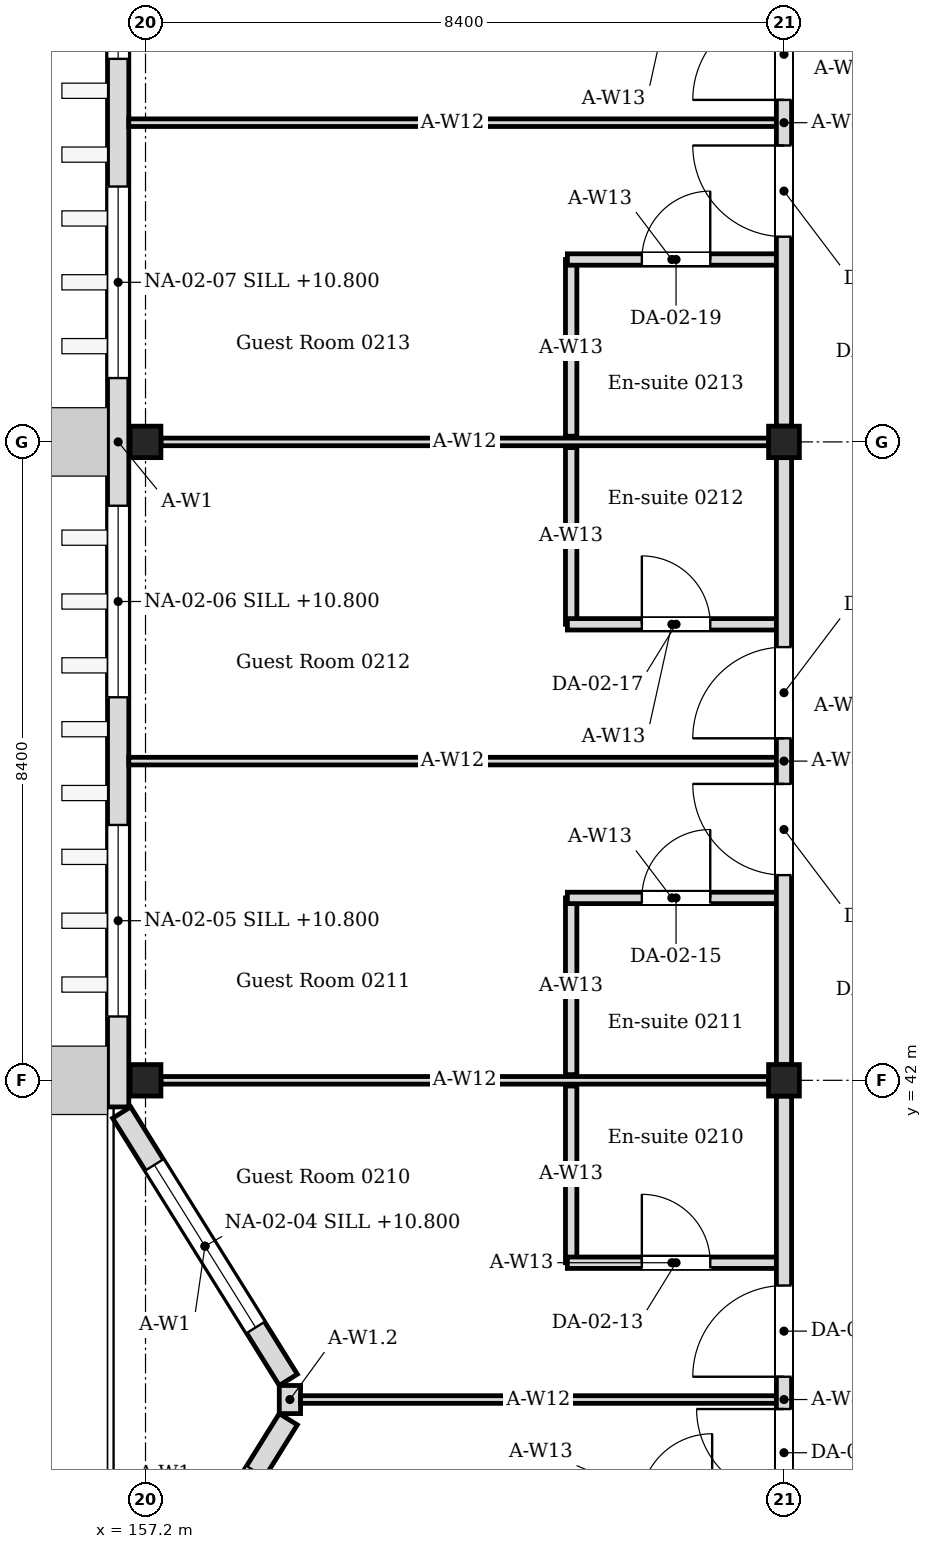
"""IFC4 building model, lengths in metres.
Left out: names, types, materials, properties, quantities, classifications, styles, units other than length and angle.
Written with IfcOpenShell. Run it as: python <this file> out.ifc"""

import sys

from ifc_helpers import new_model, si_unit, direction, frame, frame_2d, origin, origin_2d, place, context, subcontext, project, spatial, rectangle, i_section, extrude, element, fill, save


model = new_model("IFC4")
c1 = context("Model", 3, precision=1e-05, world=origin(), true_north=direction((0.0, 1.0)))
c2 = subcontext(c1, "Body", "Model", "MODEL_VIEW")
j1 = project(units=[si_unit("LENGTHUNIT", "METRE"), si_unit("PLANEANGLEUNIT", "RADIAN")], contexts=[c1])
p1 = place(None, origin())
s1 = spatial("IfcSite", under=j1, at=p1, CompositionType="ELEMENT")
p2 = place(p1, origin())
s2 = spatial("IfcBuilding", under=s1, at=p2, CompositionType="ELEMENT")
p3 = place(p2, frame((0.0, 0.0, 10.2)))
s3 = spatial("IfcBuildingStorey", under=s2, at=p3, CompositionType="ELEMENT", Elevation=10.2)
for number, where, z_axis, x_axis in (
    (1, (157.2, 42.0, 0.0), (0.0, 0.0, 1.0), (1.0, 0.0, 0.0)),
    (2, (157.2, 50.4, 0.0), (0.0, 0.0, 1.0), (1.0, 0.0, 0.0)),
    (3, (165.6, 42.0, 0.0), (0.0, 0.0, 1.0), (1.0, 0.0, 0.0)),
    (4, (165.6, 50.4, 0.0), (0.0, 0.0, 1.0), (1.0, 0.0, 0.0)),
):
    element("IfcColumn", number, at=place(p3, frame(where, z_axis=z_axis, x_axis=x_axis)), inside=s3, PredefinedType="COLUMN", context=c2, shape_type="SweptSolid", body=[
        extrude(i_section(OverallWidth=0.405, OverallDepth=0.414, WebThickness=0.018, FlangeThickness=0.028, FilletRadius=0.022, at=origin_2d()), origin(), (0.0, 0.0, 1.0), 4.2),
    ])
p4 = place(p3, frame((156.886, 34.024, 0.0), z_axis=(0.0, 0.0, 1.0), x_axis=(0.529018946142, 0.848610013271, 0.0)))
e5 = element("IfcWall", 5, at=p4, inside=s3, PredefinedType="SOLIDWALL", context=c2, shape_type="SweptSolid", body=[
    extrude(rectangle(XDim=4.144, YDim=0.28, at=frame_2d((2.072, 0.0))), origin(), (0.0, 0.0, 1.0), 4.05),
])
p5 = place(p4, frame((0.812, 0.0, 0.45)))
e6 = element("IfcOpeningElement", 6, at=p5, cuts=e5, PredefinedType="OPENING", context=c2, shape_type="SweptSolid", body=[
    extrude(rectangle(XDim=2.52, YDim=2.1, at=frame_2d((1.26, 1.05))), frame((0.0, 0.15, 0.0), z_axis=(0.0, -1.0, 0.0), x_axis=(1.0, 0.0, 0.0)), (0.0, 0.0, 1.0), 0.3),
])
p6 = place(p3, frame((159.079, 38.059, 0.0), z_axis=(0.0, 0.0, 1.0), x_axis=(-0.529018946142, 0.848610013271, 0.0)))
e7 = element("IfcWall", 7, at=p6, inside=s3, PredefinedType="SOLIDWALL", context=c2, shape_type="SweptSolid", body=[
    extrude(rectangle(XDim=4.144, YDim=0.28, at=frame_2d((2.072, 0.0))), origin(), (0.0, 0.0, 1.0), 4.05),
])
p7 = place(p6, frame((0.812, 0.0, 0.6)))
e8 = element("IfcOpeningElement", 8, at=p7, cuts=e7, PredefinedType="OPENING", context=c2, shape_type="SweptSolid", body=[
    extrude(rectangle(XDim=2.52, YDim=2.4, at=frame_2d((1.26, 1.2))), frame((0.0, 0.15, 0.0), z_axis=(0.0, -1.0, 0.0), x_axis=(1.0, 0.0, 0.0)), (0.0, 0.0, 1.0), 0.3),
])
p8 = place(p3, frame((159.1, 37.615, 0.0), z_axis=(0.0, 0.0, 1.0), x_axis=(0.0, 1.0, 0.0)))
e9 = element("IfcWall", 9, at=p8, inside=s3, PredefinedType="SOLIDWALL", context=c2, shape_type="SweptSolid", body=[
    extrude(rectangle(XDim=0.37, YDim=0.28, at=frame_2d((0.185, 0.0))), origin(), (0.0, 0.0, 1.0), 3.604),
])
p9 = place(p3, frame((156.84, 41.65, 0.0), z_axis=(0.0, 0.0, 1.0), x_axis=(0.0, 1.0, 0.0)))
e10 = element("IfcWall", 10, at=p9, inside=s3, PredefinedType="SOLIDWALL", context=c2, shape_type="SweptSolid", body=[
    extrude(rectangle(XDim=17.5, YDim=0.28, at=frame_2d((8.75, 0.0))), origin(), (0.0, 0.0, 1.0), 4.05),
])
p10 = place(p9, frame((1.19, 0.0, 0.6)))
e11 = element("IfcOpeningElement", 11, at=p10, cuts=e10, PredefinedType="OPENING", context=c2, shape_type="SweptSolid", body=[
    extrude(rectangle(XDim=2.52, YDim=2.4, at=frame_2d((1.26, 1.2))), frame((0.0, 0.15, 0.0), z_axis=(0.0, -1.0, 0.0), x_axis=(1.0, 0.0, 0.0)), (0.0, 0.0, 1.0), 0.3),
])
p11 = place(p9, frame((5.39, 0.0, 0.6)))
e12 = element("IfcOpeningElement", 12, at=p11, cuts=e10, PredefinedType="OPENING", context=c2, shape_type="SweptSolid", body=[
    extrude(rectangle(XDim=2.52, YDim=2.4, at=frame_2d((1.26, 1.2))), frame((0.0, 0.15, 0.0), z_axis=(0.0, -1.0, 0.0), x_axis=(1.0, 0.0, 0.0)), (0.0, 0.0, 1.0), 0.3),
])
p12 = place(p9, frame((9.59, 0.0, 0.6)))
e13 = element("IfcOpeningElement", 13, at=p12, cuts=e10, PredefinedType="OPENING", context=c2, shape_type="SweptSolid", body=[
    extrude(rectangle(XDim=2.52, YDim=2.4, at=frame_2d((1.26, 1.2))), frame((0.0, 0.15, 0.0), z_axis=(0.0, -1.0, 0.0), x_axis=(1.0, 0.0, 0.0)), (0.0, 0.0, 1.0), 0.3),
])
p13 = place(p9, frame((13.79, 0.0, 0.6)))
e14 = element("IfcOpeningElement", 14, at=p13, cuts=e10, PredefinedType="OPENING", context=c2, shape_type="SweptSolid", body=[
    extrude(rectangle(XDim=2.52, YDim=2.4, at=frame_2d((1.26, 1.2))), frame((0.0, 0.15, 0.0), z_axis=(0.0, -1.0, 0.0), x_axis=(1.0, 0.0, 0.0)), (0.0, 0.0, 1.0), 0.3),
])
p14 = place(p3, frame((162.8, 39.6, 0.0), z_axis=(0.0, 0.0, 1.0), x_axis=(0.0, 1.0, 0.0)))
e15 = element("IfcWall", 15, at=p14, inside=s3, PredefinedType="PARTITIONING", context=c2, shape_type="SweptSolid", body=[
    extrude(rectangle(XDim=2.325, YDim=0.15, at=frame_2d((1.163, 0.0))), origin(), (0.0, 0.0, 1.0), 4.05),
])
p15 = place(p3, frame((162.75, 39.6, 0.0), z_axis=(0.0, 0.0, 1.0), x_axis=(1.0, 0.0, 0.0)))
e16 = element("IfcWall", 16, at=p15, inside=s3, PredefinedType="PARTITIONING", context=c2, shape_type="SweptSolid", body=[
    extrude(rectangle(XDim=2.75, YDim=0.15, at=frame_2d((1.375, 0.0))), origin(), (0.0, 0.0, 1.0), 4.05),
])
p16 = place(p15, frame((0.98, 0.0, 0.0)))
e17 = element("IfcOpeningElement", 17, at=p16, cuts=e16, PredefinedType="OPENING", context=c2, shape_type="SweptSolid", body=[
    extrude(rectangle(XDim=0.9, YDim=2.1, at=frame_2d((0.45, 1.05))), frame((0.0, 0.085, 0.0), z_axis=(0.0, -1.0, 0.0), x_axis=(1.0, 0.0, 0.0)), (0.0, 0.0, 1.0), 0.17),
])
p17 = place(p3, frame((162.8, 42.075, 0.0), z_axis=(0.0, 0.0, 1.0), x_axis=(0.0, 1.0, 0.0)))
e18 = element("IfcWall", 18, at=p17, inside=s3, PredefinedType="PARTITIONING", context=c2, shape_type="SweptSolid", body=[
    extrude(rectangle(XDim=2.325, YDim=0.15, at=frame_2d((1.163, 0.0))), origin(), (0.0, 0.0, 1.0), 4.05),
])
p18 = place(p3, frame((162.75, 44.4, 0.0), z_axis=(0.0, 0.0, 1.0), x_axis=(1.0, 0.0, 0.0)))
e19 = element("IfcWall", 19, at=p18, inside=s3, PredefinedType="PARTITIONING", context=c2, shape_type="SweptSolid", body=[
    extrude(rectangle(XDim=2.75, YDim=0.15, at=frame_2d((1.375, 0.0))), origin(), (0.0, 0.0, 1.0), 4.05),
])
p19 = place(p18, frame((0.98, 0.0, 0.0)))
e20 = element("IfcOpeningElement", 20, at=p19, cuts=e19, PredefinedType="OPENING", context=c2, shape_type="SweptSolid", body=[
    extrude(rectangle(XDim=0.9, YDim=2.1, at=frame_2d((0.45, 1.05))), frame((0.0, 0.085, 0.0), z_axis=(0.0, -1.0, 0.0), x_axis=(1.0, 0.0, 0.0)), (0.0, 0.0, 1.0), 0.17),
])
p20 = place(p3, frame((162.8, 48.0, 0.0), z_axis=(0.0, 0.0, 1.0), x_axis=(0.0, 1.0, 0.0)))
e21 = element("IfcWall", 21, at=p20, inside=s3, PredefinedType="PARTITIONING", context=c2, shape_type="SweptSolid", body=[
    extrude(rectangle(XDim=2.325, YDim=0.15, at=frame_2d((1.163, 0.0))), origin(), (0.0, 0.0, 1.0), 4.05),
])
p21 = place(p3, frame((162.75, 48.0, 0.0), z_axis=(0.0, 0.0, 1.0), x_axis=(1.0, 0.0, 0.0)))
e22 = element("IfcWall", 22, at=p21, inside=s3, PredefinedType="PARTITIONING", context=c2, shape_type="SweptSolid", body=[
    extrude(rectangle(XDim=2.75, YDim=0.15, at=frame_2d((1.375, 0.0))), origin(), (0.0, 0.0, 1.0), 4.05),
])
p22 = place(p21, frame((0.98, 0.0, 0.0)))
e23 = element("IfcOpeningElement", 23, at=p22, cuts=e22, PredefinedType="OPENING", context=c2, shape_type="SweptSolid", body=[
    extrude(rectangle(XDim=0.9, YDim=2.1, at=frame_2d((0.45, 1.05))), frame((0.0, 0.085, 0.0), z_axis=(0.0, -1.0, 0.0), x_axis=(1.0, 0.0, 0.0)), (0.0, 0.0, 1.0), 0.17),
])
p23 = place(p3, frame((162.8, 50.475, 0.0), z_axis=(0.0, 0.0, 1.0), x_axis=(0.0, 1.0, 0.0)))
e24 = element("IfcWall", 24, at=p23, inside=s3, PredefinedType="PARTITIONING", context=c2, shape_type="SweptSolid", body=[
    extrude(rectangle(XDim=2.325, YDim=0.15, at=frame_2d((1.163, 0.0))), origin(), (0.0, 0.0, 1.0), 4.05),
])
p24 = place(p3, frame((162.75, 52.8, 0.0), z_axis=(0.0, 0.0, 1.0), x_axis=(1.0, 0.0, 0.0)))
e25 = element("IfcWall", 25, at=p24, inside=s3, PredefinedType="PARTITIONING", context=c2, shape_type="SweptSolid", body=[
    extrude(rectangle(XDim=2.75, YDim=0.15, at=frame_2d((1.375, 0.0))), origin(), (0.0, 0.0, 1.0), 4.05),
])
p25 = place(p24, frame((0.98, 0.0, 0.0)))
e26 = element("IfcOpeningElement", 26, at=p25, cuts=e25, PredefinedType="OPENING", context=c2, shape_type="SweptSolid", body=[
    extrude(rectangle(XDim=0.9, YDim=2.1, at=frame_2d((0.45, 1.05))), frame((0.0, 0.085, 0.0), z_axis=(0.0, -1.0, 0.0), x_axis=(1.0, 0.0, 0.0)), (0.0, 0.0, 1.0), 0.17),
])
for number, where, z_axis, x_axis in (
    (27, (157.403, 42.0, 0.0), (0.0, 0.0, 1.0), (1.0, 0.0, 0.0)),
    (28, (157.403, 50.4, 0.0), (0.0, 0.0, 1.0), (1.0, 0.0, 0.0)),
):
    element("IfcWall", number, at=place(p3, frame(where, z_axis=z_axis, x_axis=x_axis)), inside=s3, PredefinedType="PARTITIONING", context=c2, shape_type="SweptSolid", body=[
        extrude(rectangle(XDim=7.995, YDim=0.1, at=frame_2d((3.998, 0.0))), origin(), (0.0, 0.0, 1.0), 3.604),
    ])
p26 = place(p3, frame((159.24, 37.8, 0.0), z_axis=(0.0, 0.0, 1.0), x_axis=(1.0, 0.0, 0.0)))
e29 = element("IfcWall", 29, at=p26, inside=s3, PredefinedType="PARTITIONING", context=c2, shape_type="SweptSolid", body=[
    extrude(rectangle(XDim=6.26, YDim=0.1, at=frame_2d((3.13, 0.0))), origin(), (0.0, 0.0, 1.0), 3.604),
])
for number, where, z_axis, x_axis in (
    (30, (156.98, 46.2, 0.0), (0.0, 0.0, 1.0), (1.0, 0.0, 0.0)),
    (31, (156.98, 54.6, 0.0), (0.0, 0.0, 1.0), (1.0, 0.0, 0.0)),
):
    element("IfcWall", number, at=place(p3, frame(where, z_axis=z_axis, x_axis=x_axis)), inside=s3, PredefinedType="PARTITIONING", context=c2, shape_type="SweptSolid", body=[
        extrude(rectangle(XDim=8.52, YDim=0.1, at=frame_2d((4.26, 0.0))), origin(), (0.0, 0.0, 1.0), 3.604),
    ])
p27 = place(p3, frame((165.6, 33.807, 0.0), z_axis=(0.0, 0.0, 1.0), x_axis=(0.0, 1.0, 0.0)))
e32 = element("IfcWall", 32, at=p27, inside=s3, PredefinedType="PARTITIONING", context=c2, shape_type="SweptSolid", body=[
    extrude(rectangle(XDim=7.986, YDim=0.2, at=frame_2d((3.993, 0.0))), origin(), (0.0, 0.0, 1.0), 3.45),
])
p28 = place(p27, frame((2.718, 0.0, 0.0)))
e33 = element("IfcOpeningElement", 33, at=p28, cuts=e32, PredefinedType="OPENING", context=c2, shape_type="SweptSolid", body=[
    extrude(rectangle(XDim=1.15, YDim=2.1, at=frame_2d((0.575, 1.05))), frame((0.0, 0.11, 0.0), z_axis=(0.0, -1.0, 0.0), x_axis=(1.0, 0.0, 0.0)), (0.0, 0.0, 1.0), 0.22),
])
p29 = place(p27, frame((4.293, 0.0, 0.0)))
e34 = element("IfcOpeningElement", 34, at=p29, cuts=e32, PredefinedType="OPENING", context=c2, shape_type="SweptSolid", body=[
    extrude(rectangle(XDim=1.2, YDim=2.1, at=frame_2d((0.6, 1.05))), frame((0.0, 0.11, 0.0), z_axis=(0.0, -1.0, 0.0), x_axis=(1.0, 0.0, 0.0)), (0.0, 0.0, 1.0), 0.22),
])
p30 = place(p3, frame((165.6, 42.207, 0.0), z_axis=(0.0, 0.0, 1.0), x_axis=(0.0, 1.0, 0.0)))
e35 = element("IfcWall", 35, at=p30, inside=s3, PredefinedType="PARTITIONING", context=c2, shape_type="SweptSolid", body=[
    extrude(rectangle(XDim=7.986, YDim=0.2, at=frame_2d((3.993, 0.0))), origin(), (0.0, 0.0, 1.0), 3.45),
])
p31 = place(p30, frame((2.493, 0.0, 0.0)))
e36 = element("IfcOpeningElement", 36, at=p31, cuts=e35, PredefinedType="OPENING", context=c2, shape_type="SweptSolid", body=[
    extrude(rectangle(XDim=1.2, YDim=2.1, at=frame_2d((0.6, 1.05))), frame((0.0, 0.11, 0.0), z_axis=(0.0, -1.0, 0.0), x_axis=(1.0, 0.0, 0.0)), (0.0, 0.0, 1.0), 0.22),
])
p32 = place(p30, frame((4.293, 0.0, 0.0)))
e37 = element("IfcOpeningElement", 37, at=p32, cuts=e35, PredefinedType="OPENING", context=c2, shape_type="SweptSolid", body=[
    extrude(rectangle(XDim=1.2, YDim=2.1, at=frame_2d((0.6, 1.05))), frame((0.0, 0.11, 0.0), z_axis=(0.0, -1.0, 0.0), x_axis=(1.0, 0.0, 0.0)), (0.0, 0.0, 1.0), 0.22),
])
p33 = place(p3, frame((165.6, 50.607, 0.0), z_axis=(0.0, 0.0, 1.0), x_axis=(0.0, 1.0, 0.0)))
e38 = element("IfcWall", 38, at=p33, inside=s3, PredefinedType="PARTITIONING", context=c2, shape_type="SweptSolid", body=[
    extrude(rectangle(XDim=7.986, YDim=0.2, at=frame_2d((3.993, 0.0))), origin(), (0.0, 0.0, 1.0), 3.45),
])
p34 = place(p33, frame((2.493, 0.0, 0.0)))
e39 = element("IfcOpeningElement", 39, at=p34, cuts=e38, PredefinedType="OPENING", context=c2, shape_type="SweptSolid", body=[
    extrude(rectangle(XDim=1.2, YDim=2.1, at=frame_2d((0.6, 1.05))), frame((0.0, 0.11, 0.0), z_axis=(0.0, -1.0, 0.0), x_axis=(1.0, 0.0, 0.0)), (0.0, 0.0, 1.0), 0.22),
])
p35 = place(p33, frame((4.293, 0.0, 0.0)))
e40 = element("IfcOpeningElement", 40, at=p35, cuts=e38, PredefinedType="OPENING", context=c2, shape_type="SweptSolid", body=[
    extrude(rectangle(XDim=1.2, YDim=2.1, at=frame_2d((0.6, 1.05))), frame((0.0, 0.11, 0.0), z_axis=(0.0, -1.0, 0.0), x_axis=(1.0, 0.0, 0.0)), (0.0, 0.0, 1.0), 0.22),
])
p36 = place(p7, origin())
e41 = element("IfcWindow", 41, at=p36, inside=s3, PartitioningType="SINGLE_PANEL", PredefinedType="WINDOW", context=c2, shape_type="SweptSolid", body=[
    extrude(rectangle(XDim=2.52, YDim=2.4, at=frame_2d((1.26, 1.2))), frame((0.0, 0.03, 0.0), z_axis=(0.0, -1.0, 0.0), x_axis=(1.0, 0.0, 0.0)), (0.0, 0.0, 1.0), 0.06),
])
fill(e8, e41)
p37 = place(p10, origin())
e42 = element("IfcWindow", 42, at=p37, inside=s3, PartitioningType="SINGLE_PANEL", PredefinedType="WINDOW", context=c2, shape_type="SweptSolid", body=[
    extrude(rectangle(XDim=2.52, YDim=2.4, at=frame_2d((1.26, 1.2))), frame((0.0, 0.03, 0.0), z_axis=(0.0, -1.0, 0.0), x_axis=(1.0, 0.0, 0.0)), (0.0, 0.0, 1.0), 0.06),
])
fill(e11, e42)
p38 = place(p11, origin())
e43 = element("IfcWindow", 43, at=p38, inside=s3, PartitioningType="SINGLE_PANEL", PredefinedType="WINDOW", context=c2, shape_type="SweptSolid", body=[
    extrude(rectangle(XDim=2.52, YDim=2.4, at=frame_2d((1.26, 1.2))), frame((0.0, 0.03, 0.0), z_axis=(0.0, -1.0, 0.0), x_axis=(1.0, 0.0, 0.0)), (0.0, 0.0, 1.0), 0.06),
])
fill(e12, e43)
p39 = place(p12, origin())
e44 = element("IfcWindow", 44, at=p39, inside=s3, PartitioningType="SINGLE_PANEL", PredefinedType="WINDOW", context=c2, shape_type="SweptSolid", body=[
    extrude(rectangle(XDim=2.52, YDim=2.4, at=frame_2d((1.26, 1.2))), frame((0.0, 0.03, 0.0), z_axis=(0.0, -1.0, 0.0), x_axis=(1.0, 0.0, 0.0)), (0.0, 0.0, 1.0), 0.06),
])
fill(e13, e44)
p40 = place(p13, origin())
e45 = element("IfcWindow", 45, at=p40, inside=s3, PartitioningType="SINGLE_PANEL", PredefinedType="WINDOW", context=c2, shape_type="SweptSolid", body=[
    extrude(rectangle(XDim=2.52, YDim=2.4, at=frame_2d((1.26, 1.2))), frame((0.0, 0.03, 0.0), z_axis=(0.0, -1.0, 0.0), x_axis=(1.0, 0.0, 0.0)), (0.0, 0.0, 1.0), 0.06),
])
fill(e14, e45)
p41 = place(p28, origin())
e46 = element("IfcDoor", 46, at=p41, inside=s3, OperationType="SINGLE_SWING_RIGHT", PredefinedType="DOOR", context=c2, shape_type="SweptSolid", body=[
    extrude(rectangle(XDim=1.15, YDim=2.1, at=frame_2d((0.575, 1.05))), frame((0.0, 0.025, 0.0), z_axis=(0.0, -1.0, 0.0), x_axis=(1.0, 0.0, 0.0)), (0.0, 0.0, 1.0), 0.05),
])
fill(e33, e46)
p42 = place(p16, origin())
e47 = element("IfcDoor", 47, at=p42, inside=s3, OperationType="SINGLE_SWING_LEFT", PredefinedType="DOOR", context=c2, shape_type="SweptSolid", body=[
    extrude(rectangle(XDim=0.9, YDim=2.1, at=frame_2d((0.45, 1.05))), frame((0.0, 0.025, 0.0), z_axis=(0.0, -1.0, 0.0), x_axis=(1.0, 0.0, 0.0)), (0.0, 0.0, 1.0), 0.05),
])
fill(e17, e47)
p43 = place(p29, origin())
e48 = element("IfcDoor", 48, at=p43, inside=s3, OperationType="SINGLE_SWING_LEFT", PredefinedType="DOOR", context=c2, shape_type="SweptSolid", body=[
    extrude(rectangle(XDim=1.2, YDim=2.1, at=frame_2d((0.6, 1.05))), frame((0.0, 0.025, 0.0), z_axis=(0.0, -1.0, 0.0), x_axis=(1.0, 0.0, 0.0)), (0.0, 0.0, 1.0), 0.05),
])
fill(e34, e48)
p44 = place(p19, origin())
e49 = element("IfcDoor", 49, at=p44, inside=s3, OperationType="SINGLE_SWING_RIGHT", PredefinedType="DOOR", context=c2, shape_type="SweptSolid", body=[
    extrude(rectangle(XDim=0.9, YDim=2.1, at=frame_2d((0.45, 1.05))), frame((0.0, 0.025, 0.0), z_axis=(0.0, -1.0, 0.0), x_axis=(1.0, 0.0, 0.0)), (0.0, 0.0, 1.0), 0.05),
])
fill(e20, e49)
p45 = place(p31, origin())
e50 = element("IfcDoor", 50, at=p45, inside=s3, OperationType="SINGLE_SWING_RIGHT", PredefinedType="DOOR", context=c2, shape_type="SweptSolid", body=[
    extrude(rectangle(XDim=1.2, YDim=2.1, at=frame_2d((0.6, 1.05))), frame((0.0, 0.025, 0.0), z_axis=(0.0, -1.0, 0.0), x_axis=(1.0, 0.0, 0.0)), (0.0, 0.0, 1.0), 0.05),
])
fill(e36, e50)
p46 = place(p22, origin())
e51 = element("IfcDoor", 51, at=p46, inside=s3, OperationType="SINGLE_SWING_LEFT", PredefinedType="DOOR", context=c2, shape_type="SweptSolid", body=[
    extrude(rectangle(XDim=0.9, YDim=2.1, at=frame_2d((0.45, 1.05))), frame((0.0, 0.025, 0.0), z_axis=(0.0, -1.0, 0.0), x_axis=(1.0, 0.0, 0.0)), (0.0, 0.0, 1.0), 0.05),
])
fill(e23, e51)
p47 = place(p32, origin())
e52 = element("IfcDoor", 52, at=p47, inside=s3, OperationType="SINGLE_SWING_LEFT", PredefinedType="DOOR", context=c2, shape_type="SweptSolid", body=[
    extrude(rectangle(XDim=1.2, YDim=2.1, at=frame_2d((0.6, 1.05))), frame((0.0, 0.025, 0.0), z_axis=(0.0, -1.0, 0.0), x_axis=(1.0, 0.0, 0.0)), (0.0, 0.0, 1.0), 0.05),
])
fill(e37, e52)
p48 = place(p25, origin())
e53 = element("IfcDoor", 53, at=p48, inside=s3, OperationType="SINGLE_SWING_RIGHT", PredefinedType="DOOR", context=c2, shape_type="SweptSolid", body=[
    extrude(rectangle(XDim=0.9, YDim=2.1, at=frame_2d((0.45, 1.05))), frame((0.0, 0.025, 0.0), z_axis=(0.0, -1.0, 0.0), x_axis=(1.0, 0.0, 0.0)), (0.0, 0.0, 1.0), 0.05),
])
fill(e26, e53)
p49 = place(p34, origin())
e54 = element("IfcDoor", 54, at=p49, inside=s3, OperationType="SINGLE_SWING_RIGHT", PredefinedType="DOOR", context=c2, shape_type="SweptSolid", body=[
    extrude(rectangle(XDim=1.2, YDim=2.1, at=frame_2d((0.6, 1.05))), frame((0.0, 0.025, 0.0), z_axis=(0.0, -1.0, 0.0), x_axis=(1.0, 0.0, 0.0)), (0.0, 0.0, 1.0), 0.05),
])
fill(e39, e54)
p50 = place(p35, origin())
e55 = element("IfcDoor", 55, at=p50, inside=s3, OperationType="SINGLE_SWING_LEFT", PredefinedType="DOOR", context=c2, shape_type="SweptSolid", body=[
    extrude(rectangle(XDim=1.2, YDim=2.1, at=frame_2d((0.6, 1.05))), frame((0.0, 0.025, 0.0), z_axis=(0.0, -1.0, 0.0), x_axis=(1.0, 0.0, 0.0)), (0.0, 0.0, 1.0), 0.05),
])
fill(e40, e55)
save(model, sys.argv[1])
